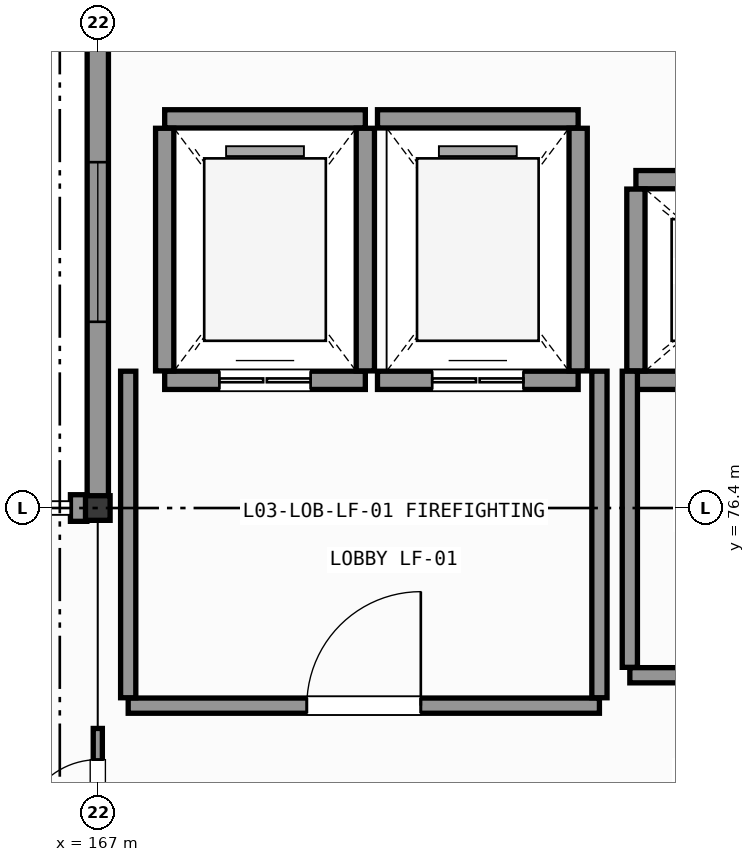
"""IFC4 building model, lengths in metres.
Left out: names, types, materials, properties, quantities, classifications, styles, units other than length and angle.
Written with IfcOpenShell. Run it as: python <this file> out.ifc"""

import sys

from ifc_helpers import new_model, si_unit, direction, frame, frame_2d, origin, origin_2d, place, context, subcontext, project, spatial, rectangle, hollow_circle, extrude, element, fill, save


model = new_model("IFC4")
c1 = context("Model", 3, precision=1e-05, world=origin(), true_north=direction((0.0, 1.0)))
c2 = subcontext(c1, "Body", "Model", "MODEL_VIEW")
j1 = project(units=[si_unit("LENGTHUNIT", "METRE"), si_unit("PLANEANGLEUNIT", "RADIAN")], contexts=[c1])
p1 = place(None, origin())
s1 = spatial("IfcSite", under=j1, at=p1, CompositionType="ELEMENT")
p2 = place(p1, origin())
s2 = spatial("IfcBuilding", under=s1, at=p2, CompositionType="ELEMENT")
p3 = place(p2, frame((0.0, 0.0, 13.2)))
s3 = spatial("IfcBuildingStorey", under=s2, at=p3, CompositionType="ELEMENT", Elevation=13.2)
p4 = place(p3, frame((167.0, 76.4, 0.0), z_axis=(0.0, 0.0, 1.0), x_axis=(1.0, 0.0, 0.0)))
e1 = element("IfcColumn", 1, at=p4, inside=s3, PredefinedType="COLUMN", context=c2, shape_type="SweptSolid", body=[
    extrude(hollow_circle(Radius=0.162, WallThickness=0.016, at=origin_2d()), origin(), (0.0, 0.0, 1.0), 4.8),
])
p5 = place(p3, frame((167.0, 76.4, 0.0), z_axis=(0.0, 0.0, 1.0), x_axis=(0.0, 1.0, 0.0)))
e2 = element("IfcWall", 2, at=p5, inside=s3, PredefinedType="SOLIDWALL", context=c2, shape_type="SweptSolid", body=[
    extrude(rectangle(XDim=7.0, YDim=0.28, at=frame_2d((3.5, 0.0))), origin(), (0.0, 0.0, 1.0), 4.215),
])
p6 = place(p5, frame((2.45, 0.0, 0.95)))
e3 = element("IfcOpeningElement", 3, at=p6, cuts=e2, PredefinedType="OPENING", context=c2, shape_type="SweptSolid", body=[
    extrude(rectangle(XDim=2.1, YDim=2.8, at=frame_2d((1.05, 1.4))), frame((0.0, 0.15, 0.0), z_axis=(0.0, -1.0, 0.0), x_axis=(1.0, 0.0, 0.0)), (0.0, 0.0, 1.0), 0.3),
])
p7 = place(p3, frame((166.856, 76.4, 0.0), z_axis=(0.0, 0.0, 1.0), x_axis=(-1.0, 0.0, 0.0)))
e4 = element("IfcWall", 4, at=p7, inside=s3, PredefinedType="SOLIDWALL", context=c2, shape_type="SweptSolid", body=[
    extrude(rectangle(XDim=0.216, YDim=0.35, at=frame_2d((0.108, 0.0))), origin(), (0.0, 0.0, 1.0), 4.56),
])
p8 = place(p3, frame((167.88, 78.08, 0.0), z_axis=(0.0, 0.0, 1.0), x_axis=(1.0, 0.0, 0.0)))
e5 = element("IfcWall", 5, at=p8, inside=s3, PredefinedType="SHEAR", context=c2, shape_type="SweptSolid", body=[
    extrude(rectangle(XDim=2.64, YDim=0.24, at=frame_2d((1.32, 0.0))), origin(), (0.0, 0.0, 1.0), 4.56),
])
p9 = place(p8, frame((0.72, 0.0, 0.0)))
e6 = element("IfcOpeningElement", 6, at=p9, cuts=e5, PredefinedType="OPENING", context=c2, shape_type="SweptSolid", body=[
    extrude(rectangle(XDim=1.2, YDim=2.2, at=frame_2d((0.6, 1.1))), frame((0.0, 0.13, 0.0), z_axis=(0.0, -1.0, 0.0), x_axis=(1.0, 0.0, 0.0)), (0.0, 0.0, 1.0), 0.26),
])
p10 = place(p3, frame((167.88, 81.52, 0.0), z_axis=(0.0, 0.0, 1.0), x_axis=(1.0, 0.0, 0.0)))
e7 = element("IfcWall", 7, at=p10, inside=s3, PredefinedType="SHEAR", context=c2, shape_type="SweptSolid", body=[
    extrude(rectangle(XDim=2.64, YDim=0.24, at=frame_2d((1.32, 0.0))), origin(), (0.0, 0.0, 1.0), 4.56),
])
for number, where, z_axis, x_axis in (
    (8, (167.88, 78.204, 0.0), (0.0, 0.0, 1.0), (0.0, 1.0, 0.0)),
    (9, (170.52, 78.204, 0.0), (0.0, 0.0, 1.0), (0.0, 1.0, 0.0)),
):
    element("IfcWall", number, at=place(p3, frame(where, z_axis=z_axis, x_axis=x_axis)), inside=s3, PredefinedType="SHEAR", context=c2, shape_type="SweptSolid", body=[
        extrude(rectangle(XDim=3.192, YDim=0.24, at=frame_2d((1.596, 0.0))), origin(), (0.0, 0.0, 1.0), 4.56),
    ])
p11 = place(p3, frame((170.68, 78.08, 0.0), z_axis=(0.0, 0.0, 1.0), x_axis=(1.0, 0.0, 0.0)))
e10 = element("IfcWall", 10, at=p11, inside=s3, PredefinedType="SHEAR", context=c2, shape_type="SweptSolid", body=[
    extrude(rectangle(XDim=2.64, YDim=0.24, at=frame_2d((1.32, 0.0))), origin(), (0.0, 0.0, 1.0), 4.56),
])
p12 = place(p11, frame((0.72, 0.0, 0.0)))
e11 = element("IfcOpeningElement", 11, at=p12, cuts=e10, PredefinedType="OPENING", context=c2, shape_type="SweptSolid", body=[
    extrude(rectangle(XDim=1.2, YDim=2.2, at=frame_2d((0.6, 1.1))), frame((0.0, 0.13, 0.0), z_axis=(0.0, -1.0, 0.0), x_axis=(1.0, 0.0, 0.0)), (0.0, 0.0, 1.0), 0.26),
])
p13 = place(p3, frame((170.68, 81.52, 0.0), z_axis=(0.0, 0.0, 1.0), x_axis=(1.0, 0.0, 0.0)))
e12 = element("IfcWall", 12, at=p13, inside=s3, PredefinedType="SHEAR", context=c2, shape_type="SweptSolid", body=[
    extrude(rectangle(XDim=2.64, YDim=0.24, at=frame_2d((1.32, 0.0))), origin(), (0.0, 0.0, 1.0), 4.56),
])
p14 = place(p3, frame((173.32, 78.204, 0.0), z_axis=(0.0, 0.0, 1.0), x_axis=(0.0, 1.0, 0.0)))
e13 = element("IfcWall", 13, at=p14, inside=s3, PredefinedType="SHEAR", context=c2, shape_type="SweptSolid", body=[
    extrude(rectangle(XDim=3.192, YDim=0.24, at=frame_2d((1.596, 0.0))), origin(), (0.0, 0.0, 1.0), 4.56),
])
p15 = place(p3, frame((174.08, 78.08, 0.0), z_axis=(0.0, 0.0, 1.0), x_axis=(1.0, 0.0, 0.0)))
e14 = element("IfcWall", 14, at=p15, inside=s3, PredefinedType="SHEAR", context=c2, shape_type="SweptSolid", body=[
    extrude(rectangle(XDim=3.04, YDim=0.24, at=frame_2d((1.52, 0.0))), origin(), (0.0, 0.0, 1.0), 4.56),
])
p16 = place(p15, frame((0.97, 0.0, 0.0)))
e15 = element("IfcOpeningElement", 15, at=p16, cuts=e14, PredefinedType="OPENING", context=c2, shape_type="SweptSolid", body=[
    extrude(rectangle(XDim=1.1, YDim=2.2, at=frame_2d((0.55, 1.1))), frame((0.0, 0.13, 0.0), z_axis=(0.0, -1.0, 0.0), x_axis=(1.0, 0.0, 0.0)), (0.0, 0.0, 1.0), 0.26),
])
p17 = place(p3, frame((174.08, 80.72, 0.0), z_axis=(0.0, 0.0, 1.0), x_axis=(1.0, 0.0, 0.0)))
e16 = element("IfcWall", 16, at=p17, inside=s3, PredefinedType="SHEAR", context=c2, shape_type="SweptSolid", body=[
    extrude(rectangle(XDim=3.04, YDim=0.24, at=frame_2d((1.52, 0.0))), origin(), (0.0, 0.0, 1.0), 4.56),
])
p18 = place(p3, frame((174.08, 78.204, 0.0), z_axis=(0.0, 0.0, 1.0), x_axis=(0.0, 1.0, 0.0)))
e17 = element("IfcWall", 17, at=p18, inside=s3, PredefinedType="SHEAR", context=c2, shape_type="SweptSolid", body=[
    extrude(rectangle(XDim=2.392, YDim=0.24, at=frame_2d((1.196, 0.0))), origin(), (0.0, 0.0, 1.0), 4.56),
])
p19 = place(p3, frame((167.4, 73.8, 0.0), z_axis=(0.0, 0.0, 1.0), x_axis=(1.0, 0.0, 0.0)))
e18 = element("IfcWall", 18, at=p19, inside=s3, PredefinedType="PARTITIONING", context=c2, shape_type="SweptSolid", body=[
    extrude(rectangle(XDim=6.2, YDim=0.2, at=frame_2d((3.1, 0.0))), origin(), (0.0, 0.0, 1.0), 4.145),
])
p20 = place(p19, frame((2.35, 0.0, 0.0)))
e19 = element("IfcOpeningElement", 19, at=p20, cuts=e18, PredefinedType="OPENING", context=c2, shape_type="SweptSolid", body=[
    extrude(rectangle(XDim=1.5, YDim=2.2, at=frame_2d((0.75, 1.1))), frame((0.0, 0.11, 0.0), z_axis=(0.0, -1.0, 0.0), x_axis=(1.0, 0.0, 0.0)), (0.0, 0.0, 1.0), 0.22),
])
for number, where, z_axis, x_axis in (
    (20, (167.4, 73.904, 0.0), (0.0, 0.0, 1.0), (0.0, 1.0, 0.0)),
    (21, (173.6, 73.904, 0.0), (0.0, 0.0, 1.0), (0.0, 1.0, 0.0)),
):
    element("IfcWall", number, at=place(p3, frame(where, z_axis=z_axis, x_axis=x_axis)), inside=s3, PredefinedType="PARTITIONING", context=c2, shape_type="SweptSolid", body=[
        extrude(rectangle(XDim=4.296, YDim=0.2, at=frame_2d((2.148, 0.0))), origin(), (0.0, 0.0, 1.0), 4.56),
    ])
p21 = place(p3, frame((174.0, 74.2, 0.0), z_axis=(0.0, 0.0, 1.0), x_axis=(1.0, 0.0, 0.0)))
e22 = element("IfcWall", 22, at=p21, inside=s3, PredefinedType="PARTITIONING", context=c2, shape_type="SweptSolid", body=[
    extrude(rectangle(XDim=3.2, YDim=0.2, at=frame_2d((1.6, 0.0))), origin(), (0.0, 0.0, 1.0), 4.56),
])
p22 = place(p21, frame((0.85, 0.0, 0.0)))
e23 = element("IfcOpeningElement", 23, at=p22, cuts=e22, PredefinedType="OPENING", context=c2, shape_type="SweptSolid", body=[
    extrude(rectangle(XDim=1.5, YDim=2.2, at=frame_2d((0.75, 1.1))), frame((0.0, 0.11, 0.0), z_axis=(0.0, -1.0, 0.0), x_axis=(1.0, 0.0, 0.0)), (0.0, 0.0, 1.0), 0.22),
])
p23 = place(p3, frame((174.0, 74.304, 0.0), z_axis=(0.0, 0.0, 1.0), x_axis=(0.0, 1.0, 0.0)))
e24 = element("IfcWall", 24, at=p23, inside=s3, PredefinedType="PARTITIONING", context=c2, shape_type="SweptSolid", body=[
    extrude(rectangle(XDim=3.896, YDim=0.2, at=frame_2d((1.948, 0.0))), origin(), (0.0, 0.0, 1.0), 4.56),
])
p24 = place(p3, frame((167.0, 71.679, 0.0), z_axis=(0.0, 0.0, 1.0), x_axis=(0.0, 1.0, 0.0)))
e25 = element("IfcWall", 25, at=p24, inside=s3, PredefinedType="PARTITIONING", context=c2, shape_type="SweptSolid", body=[
    extrude(rectangle(XDim=1.821, YDim=0.12, at=frame_2d((0.911, 0.0))), origin(), (0.0, 0.0, 1.0), 4.065),
])
p25 = place(p24, frame((0.41, 0.0, 0.0)))
e26 = element("IfcOpeningElement", 26, at=p25, cuts=e25, PredefinedType="OPENING", context=c2, shape_type="SweptSolid", body=[
    extrude(rectangle(XDim=1.0, YDim=2.15, at=frame_2d((0.5, 1.075))), frame((0.0, 0.07, 0.0), z_axis=(0.0, -1.0, 0.0), x_axis=(1.0, 0.0, 0.0)), (0.0, 0.0, 1.0), 0.14),
])
p26 = place(p6, origin())
e27 = element("IfcWindow", 27, at=p26, inside=s3, PartitioningType="SINGLE_PANEL", PredefinedType="WINDOW", context=c2, shape_type="SweptSolid", body=[
    extrude(rectangle(XDim=2.1, YDim=2.8, at=frame_2d((1.05, 1.4))), frame((0.0, 0.03, 0.0), z_axis=(0.0, -1.0, 0.0), x_axis=(1.0, 0.0, 0.0)), (0.0, 0.0, 1.0), 0.06),
])
fill(e3, e27)
p27 = place(p9, origin())
e28 = element("IfcDoor", 28, at=p27, inside=s3, OperationType="DOUBLE_DOOR_SLIDING", PredefinedType="DOOR", context=c2, shape_type="SweptSolid", body=[
    extrude(rectangle(XDim=1.2, YDim=2.2, at=frame_2d((0.6, 1.1))), frame((0.0, 0.025, 0.0), z_axis=(0.0, -1.0, 0.0), x_axis=(1.0, 0.0, 0.0)), (0.0, 0.0, 1.0), 0.05),
])
fill(e6, e28)
p28 = place(p12, origin())
e29 = element("IfcDoor", 29, at=p28, inside=s3, OperationType="DOUBLE_DOOR_SLIDING", PredefinedType="DOOR", context=c2, shape_type="SweptSolid", body=[
    extrude(rectangle(XDim=1.2, YDim=2.2, at=frame_2d((0.6, 1.1))), frame((0.0, 0.025, 0.0), z_axis=(0.0, -1.0, 0.0), x_axis=(1.0, 0.0, 0.0)), (0.0, 0.0, 1.0), 0.05),
])
fill(e11, e29)
p29 = place(p20, origin())
e30 = element("IfcDoor", 30, at=p29, inside=s3, OperationType="SINGLE_SWING_RIGHT", PredefinedType="DOOR", context=c2, shape_type="SweptSolid", body=[
    extrude(rectangle(XDim=1.5, YDim=2.2, at=frame_2d((0.75, 1.1))), frame((0.0, 0.025, 0.0), z_axis=(0.0, -1.0, 0.0), x_axis=(1.0, 0.0, 0.0)), (0.0, 0.0, 1.0), 0.05),
])
fill(e19, e30)
p30 = place(p25, origin())
e31 = element("IfcDoor", 31, at=p30, inside=s3, OperationType="SINGLE_SWING_LEFT", PredefinedType="DOOR", context=c2, shape_type="SweptSolid", body=[
    extrude(rectangle(XDim=1.0, YDim=2.15, at=frame_2d((0.5, 1.075))), frame((0.0, 0.025, 0.0), z_axis=(0.0, -1.0, 0.0), x_axis=(1.0, 0.0, 0.0)), (0.0, 0.0, 1.0), 0.05),
])
fill(e26, e31)
save(model, sys.argv[1])
